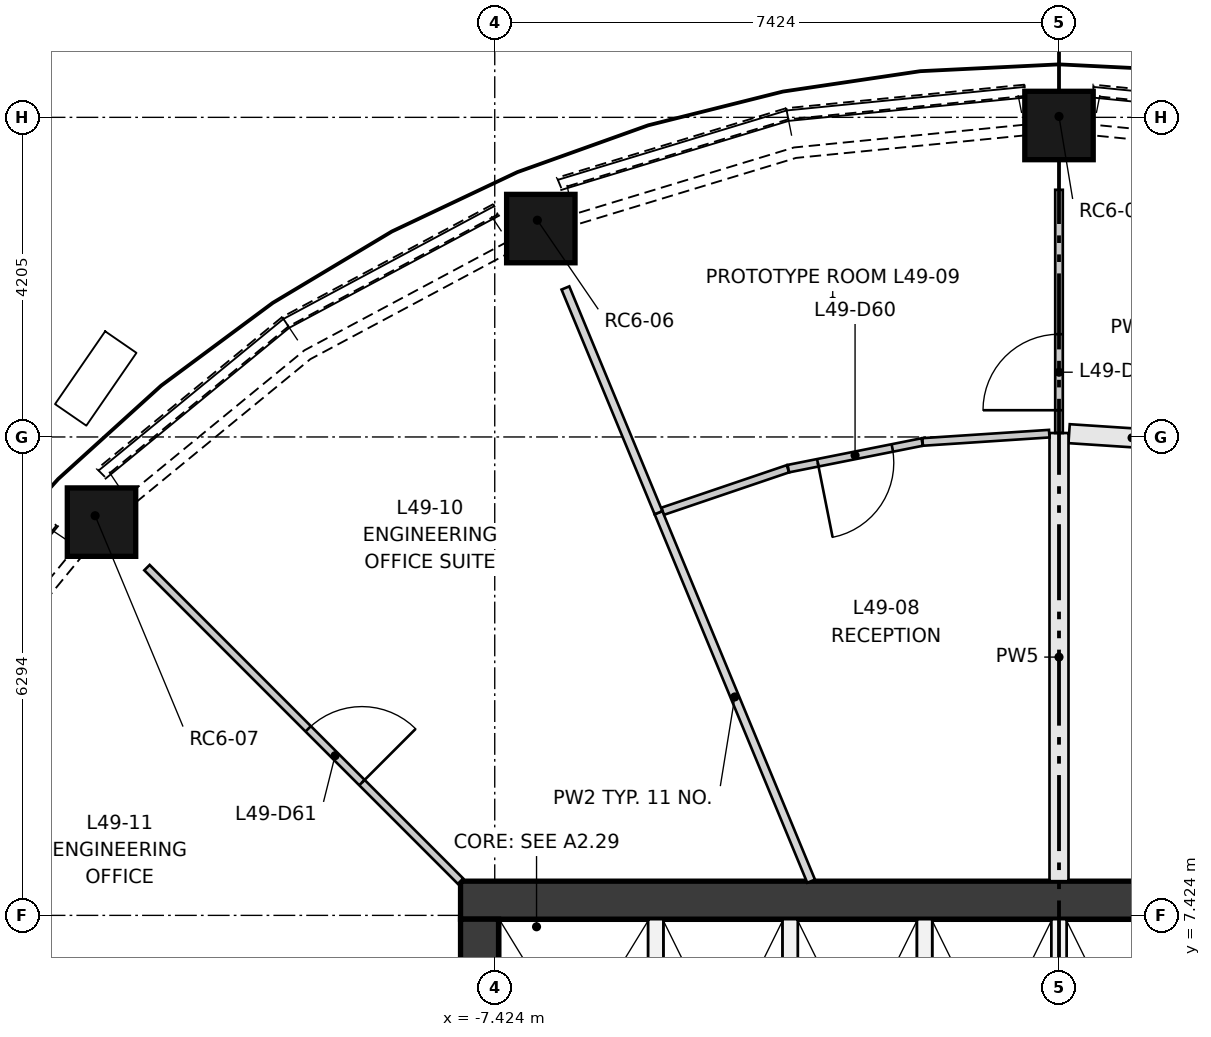
"""IFC4 building model, lengths in metres.
Left out: names, types, materials, properties, quantities, classifications, styles, units other than length and angle.
Written with IfcOpenShell. Run it as: python <this file> out.ifc"""

import sys

from ifc_helpers import new_model, si_unit, direction, frame, frame_2d, origin, origin_2d, place, context, subcontext, project, spatial, polyline, rectangle, outline, extrude, element, fill, save


model = new_model("IFC4")
c1 = context("Model", 3, precision=1e-05, world=origin(), true_north=direction((0.0, 1.0)))
c2 = subcontext(c1, "Body", "Model", "MODEL_VIEW")
j1 = project(units=[si_unit("LENGTHUNIT", "METRE"), si_unit("PLANEANGLEUNIT", "RADIAN")], contexts=[c1])
p1 = place(None, origin())
s1 = spatial("IfcSite", under=j1, at=p1, CompositionType="ELEMENT")
p2 = place(p1, origin())
s2 = spatial("IfcBuilding", under=s1, at=p2, CompositionType="ELEMENT")
p3 = place(p2, frame((0.0, 0.0, 184.3)))
s3 = spatial("IfcBuildingStorey", under=s2, at=p3, CompositionType="ELEMENT", Elevation=184.3)
p4 = place(p3, frame((0.0, 17.935, 0.5), z_axis=(0.0, 0.0, 1.0), x_axis=(1.0, 0.0, 0.0)))
e1 = element("IfcColumn", 1, at=p4, inside=s3, PredefinedType="COLUMN", context=c2, shape_type="SweptSolid", body=[
    extrude(rectangle(XDim=0.9, YDim=0.9, at=origin_2d()), origin(), (0.0, -0.168, 0.986), 2.384),
])
p5 = place(p3, frame((-6.863, 16.57, 0.5), z_axis=(0.0, 0.0, 1.0), x_axis=(0.924120904221, 0.382100188932, 0.0)))
e2 = element("IfcColumn", 2, at=p5, inside=s3, PredefinedType="COLUMN", context=c2, shape_type="SweptSolid", body=[
    extrude(rectangle(XDim=0.9, YDim=0.9, at=origin_2d()), origin(), (0.0, -0.168, 0.986), 2.384),
])
p6 = place(p3, frame((-12.682, 12.682, 0.5), z_axis=(0.0, 0.0, 1.0), x_axis=(0.707106781187, 0.707106781187, 0.0)))
e3 = element("IfcColumn", 3, at=p6, inside=s3, PredefinedType="COLUMN", context=c2, shape_type="SweptSolid", body=[
    extrude(rectangle(XDim=0.9, YDim=0.9, at=origin_2d()), origin(), (0.0, -0.168, 0.986), 2.384),
])
p7 = place(p3, frame((-7.874, 7.624, 0.0), z_axis=(0.0, 0.0, 1.0), x_axis=(1.0, 0.0, 0.0)))
e4 = element("IfcWall", 4, at=p7, inside=s3, PredefinedType="SHEAR", context=c2, shape_type="SweptSolid", body=[
    extrude(rectangle(XDim=15.748, YDim=0.5, at=frame_2d((7.874, 0.0))), origin(), (0.0, 0.0, 1.0), 3.35),
])
p8 = place(p3, frame((-7.624, -7.374, 0.0), z_axis=(0.0, 0.0, 1.0), x_axis=(0.0, 1.0, 0.0)))
e5 = element("IfcWall", 5, at=p8, inside=s3, PredefinedType="SHEAR", context=c2, shape_type="SweptSolid", body=[
    extrude(rectangle(XDim=14.748, YDim=0.5, at=frame_2d((7.374, 0.0))), origin(), (0.0, 0.0, 1.0), 3.35),
])
p9 = place(p8, frame((6.874, 0.0, 0.0)))
e6 = element("IfcOpeningElement", 6, at=p9, cuts=e5, PredefinedType="OPENING", context=c2, shape_type="SweptSolid", body=[
    extrude(rectangle(XDim=1.0, YDim=2.1, at=frame_2d((0.5, 1.05))), frame((0.0, 0.26, 0.0), z_axis=(0.0, -1.0, 0.0), x_axis=(1.0, 0.0, 0.0)), (0.0, 0.0, 1.0), 0.52),
])
p10 = place(p8, frame((3.75, 0.0, 0.0)))
e7 = element("IfcOpeningElement", 7, at=p10, cuts=e5, PredefinedType="OPENING", context=c2, shape_type="SweptSolid", body=[
    extrude(rectangle(XDim=1.8, YDim=2.1, at=frame_2d((0.9, 1.05))), frame((0.0, 0.26, 0.0), z_axis=(0.0, -1.0, 0.0), x_axis=(1.0, 0.0, 0.0)), (0.0, 0.0, 1.0), 0.52),
])
p11 = place(p8, frame((9.198, 0.0, 0.0)))
e8 = element("IfcOpeningElement", 8, at=p11, cuts=e5, PredefinedType="OPENING", context=c2, shape_type="SweptSolid", body=[
    extrude(rectangle(XDim=1.8, YDim=2.1, at=frame_2d((0.9, 1.05))), frame((0.0, 0.26, 0.0), z_axis=(0.0, -1.0, 0.0), x_axis=(1.0, 0.0, 0.0)), (0.0, 0.0, 1.0), 0.52),
])
for number, where, z_axis, x_axis in (
    (9, (-5.305, 4.174, 0.0), (0.0, 0.0, 1.0), (0.0, 1.0, 0.0)),
    (10, (-3.537, 4.174, 0.0), (0.0, 0.0, 1.0), (0.0, 1.0, 0.0)),
    (11, (-1.769, 4.174, 0.0), (0.0, 0.0, 1.0), (0.0, 1.0, 0.0)),
    (12, (0.0, 4.174, 0.0), (0.0, 0.0, 1.0), (0.0, 1.0, 0.0)),
):
    element("IfcWall", number, at=place(p3, frame(where, z_axis=z_axis, x_axis=x_axis)), inside=s3, PredefinedType="PARTITIONING", context=c2, shape_type="SweptSolid", body=[
        extrude(rectangle(XDim=3.2, YDim=0.2, at=frame_2d((1.6, 0.0))), origin(), (0.0, 0.0, 1.0), 3.0),
    ])
p12 = place(p3, frame((3.59, 18.043, 0.0), z_axis=(0.097001095349, 0.981910573414, 0.162611233681), x_axis=(-0.995155966643, 0.098308707783, 5.283619e-06)))
e13 = element("IfcWall", 13, at=p12, inside=s3, PredefinedType="SOLIDWALL", context=c2, shape_type="SweptSolid", body=[
    extrude(outline(polyline([(0.0, 0.0), (3.152, 0.0), (3.138, 0.912), (0.015, 0.912), (0.0, 0.0)])), origin(), (0.0, 0.0, -1.0), 0.3),
])
p13 = place(p3, frame((-0.452, 18.353, 0.0), z_axis=(-0.096960979381, 0.981893053275, 0.162740899619), x_axis=(-0.995159671342, -0.098271198901, 9.28862e-07)))
e14 = element("IfcWall", 14, at=p13, inside=s3, PredefinedType="SOLIDWALL", context=c2, shape_type="SweptSolid", body=[
    extrude(outline(polyline([(0.0, 0.0), (3.152, 1.388e-17), (3.138, 0.912), (0.015, 0.912), (0.0, 0.0)])), origin(), (0.0, 0.0, -1.0), 0.3),
])
p14 = place(p3, frame((-3.59, 18.043, 0.0), z_axis=(-0.286418531815, 0.944194299341, 0.162670064008), x_axis=(-0.956940039415, -0.290285654048, 4.29464e-06)))
e15 = element("IfcWall", 15, at=p14, inside=s3, PredefinedType="SOLIDWALL", context=c2, shape_type="SweptSolid", body=[
    extrude(outline(polyline([(0.0, 0.0), (3.151, 5.551e-17), (3.137, 0.912), (0.014, 0.912), (0.0, 0.0)])), origin(), (0.0, 0.0, -1.0), 0.3),
])
p15 = place(p3, frame((-7.441, 16.782, 0.0), z_axis=(-0.465338838382, 0.870053087177, 0.162688017342), x_axis=(-0.881801348468, -0.471621015005, -6.731272e-06)))
e16 = element("IfcWall", 16, at=p15, inside=s3, PredefinedType="SOLIDWALL", context=c2, shape_type="SweptSolid", body=[
    extrude(outline(polyline([(0.0, 0.0), (3.152, 2.776e-17), (3.137, 0.912), (0.015, 0.912), (0.0, 0.0)])), origin(), (0.0, 0.0, -1.0), 0.3),
])
p16 = place(p3, frame((-10.221, 15.296, 0.0), z_axis=(-0.625791219471, 0.762829436571, 0.162716318582), x_axis=(-0.773132385109, -0.634244680745, 6.479811e-06)))
e17 = element("IfcWall", 17, at=p16, inside=s3, PredefinedType="SOLIDWALL", context=c2, shape_type="SweptSolid", body=[
    extrude(outline(polyline([(0.0, 0.0), (3.151, 0.0), (3.137, 0.912), (0.014, 0.912), (0.0, 0.0)])), origin(), (0.0, 0.0, -1.0), 0.3),
])
p17 = place(p3, frame((-13.297, 12.657, 0.0), z_axis=(-0.762803450932, 0.625801401555, 0.162798959018), x_axis=(-0.634263258583, -0.773117144297, -2.518315e-06)))
e18 = element("IfcWall", 18, at=p17, inside=s3, PredefinedType="SOLIDWALL", context=c2, shape_type="SweptSolid", body=[
    extrude(outline(polyline([(0.0, 0.0), (3.151, 5.551e-17), (3.137, 0.912), (0.015, 0.912), (0.0, 0.0)])), origin(), (0.0, 0.0, -1.0), 0.3),
])
p18 = place(p3, frame((0.133, 13.761, 0.0), z_axis=(0.0, 0.0, 1.0), x_axis=(0.997854270927, -0.065474071153, 0.0)))
e19 = element("IfcWall", 19, at=p18, inside=s3, PredefinedType="PARTITIONING", context=c2, shape_type="SweptSolid", body=[
    extrude(rectangle(XDim=1.659, YDim=0.25, at=frame_2d((0.83, 0.0))), origin(), (0.0, 0.0, 1.0), 3.0),
])
p19 = place(p3, frame((0.0, 7.874, 0.0), z_axis=(0.0, 0.0, 1.0), x_axis=(0.0, 1.0, 0.0)))
e20 = element("IfcWall", 20, at=p19, inside=s3, PredefinedType="PARTITIONING", context=c2, shape_type="SweptSolid", body=[
    extrude(rectangle(XDim=5.896, YDim=0.25, at=frame_2d((2.948, 0.0))), origin(), (0.0, 0.0, 1.0), 3.0),
])
p20 = place(p3, frame((0.0, 13.77, 0.0), z_axis=(0.0, 0.0, 1.0), x_axis=(0.0, 1.0, 0.0)))
e21 = element("IfcWall", 21, at=p20, inside=s3, PredefinedType="PARTITIONING", context=c2, shape_type="SweptSolid", body=[
    extrude(rectangle(XDim=3.2, YDim=0.1, at=frame_2d((1.6, 0.0))), origin(), (0.0, 0.0, 1.0), 3.0),
])
p21 = place(p20, frame((0.3, 0.0, 0.0)))
e22 = element("IfcOpeningElement", 22, at=p21, cuts=e21, PredefinedType="OPENING", context=c2, shape_type="SweptSolid", body=[
    extrude(rectangle(XDim=1.0, YDim=2.1, at=frame_2d((0.5, 1.05))), frame((0.0, 0.06, 0.0), z_axis=(0.0, -1.0, 0.0), x_axis=(1.0, 0.0, 0.0)), (0.0, 0.0, 1.0), 0.12),
])
p22 = place(p3, frame((-5.214, 12.74, 0.0), z_axis=(0.0, 0.0, 1.0), x_axis=(0.946914638305, 0.321485097267, 0.0)))
e23 = element("IfcWall", 23, at=p22, inside=s3, PredefinedType="PARTITIONING", context=c2, shape_type="SweptSolid", body=[
    extrude(rectangle(XDim=1.74, YDim=0.1, at=frame_2d((0.87, 0.0))), origin(), (0.0, 0.0, 1.0), 3.0),
])
p23 = place(p3, frame((-1.801, 13.652, 0.0), z_axis=(0.0, 0.0, 1.0), x_axis=(-0.980789397091, -0.195069624886, 0.0)))
e24 = element("IfcWall", 24, at=p23, inside=s3, PredefinedType="PARTITIONING", context=c2, shape_type="SweptSolid", body=[
    extrude(rectangle(XDim=1.795, YDim=0.1, at=frame_2d((0.897, 0.0))), origin(), (0.0, 0.0, 1.0), 3.0),
])
p24 = place(p23, frame((0.4, 0.0, 0.0)))
e25 = element("IfcOpeningElement", 25, at=p24, cuts=e24, PredefinedType="OPENING", context=c2, shape_type="SweptSolid", body=[
    extrude(rectangle(XDim=1.0, YDim=2.1, at=frame_2d((0.5, 1.05))), frame((0.0, 0.06, 0.0), z_axis=(0.0, -1.0, 0.0), x_axis=(1.0, 0.0, 0.0)), (0.0, 0.0, 1.0), 0.12),
])
p25 = place(p3, frame((-1.794, 13.652, 0.0), z_axis=(0.0, 0.0, 1.0), x_axis=(0.997850681937, 0.065528746043, 0.0)))
e26 = element("IfcWall", 26, at=p25, inside=s3, PredefinedType="PARTITIONING", context=c2, shape_type="SweptSolid", body=[
    extrude(rectangle(XDim=1.669, YDim=0.1, at=frame_2d((0.834, 0.0))), origin(), (0.0, 0.0, 1.0), 3.0),
])
p26 = place(p3, frame((-3.261, 7.874, 0.0), z_axis=(0.0, 0.0, 1.0), x_axis=(-0.382698345407, 0.923873355186, 0.0)))
e27 = element("IfcWall", 27, at=p26, inside=s3, PredefinedType="PARTITIONING", context=c2, shape_type="SweptSolid", body=[
    extrude(rectangle(XDim=5.247, YDim=0.11, at=frame_2d((2.624, 0.0))), origin(), (0.0, 0.0, 1.0), 3.0),
])
p27 = place(p3, frame((-5.27, 12.722, 0.0), z_axis=(0.0, 0.0, 1.0), x_axis=(-0.382675211785, 0.923882937544, 0.0)))
e28 = element("IfcWall", 28, at=p27, inside=s3, PredefinedType="PARTITIONING", context=c2, shape_type="SweptSolid", body=[
    extrude(rectangle(XDim=3.2, YDim=0.11, at=frame_2d((1.6, 0.0))), origin(), (0.0, 0.0, 1.0), 3.0),
])
p28 = place(p3, frame((-12.0, 12.0, 0.0), z_axis=(0.0, 0.0, 1.0), x_axis=(0.707106781187, -0.707106781187, 0.0)))
e29 = element("IfcWall", 29, at=p28, inside=s3, PredefinedType="PARTITIONING", context=c2, shape_type="SweptSolid", body=[
    extrude(rectangle(XDim=5.834, YDim=0.1, at=frame_2d((2.917, 0.0))), origin(), (0.0, 0.0, 1.0), 3.0),
])
p29 = place(p28, frame((3.0, 0.0, 0.0)))
e30 = element("IfcOpeningElement", 30, at=p29, cuts=e29, PredefinedType="OPENING", context=c2, shape_type="SweptSolid", body=[
    extrude(rectangle(XDim=1.0, YDim=2.1, at=frame_2d((0.5, 1.05))), frame((0.0, 0.06, 0.0), z_axis=(0.0, -1.0, 0.0), x_axis=(1.0, 0.0, 0.0)), (0.0, 0.0, 1.0), 0.12),
])
p30 = place(p21, origin())
e31 = element("IfcDoor", 31, at=p30, inside=s3, OperationType="SINGLE_SWING_LEFT", PredefinedType="DOOR", context=c2, shape_type="SweptSolid", body=[
    extrude(rectangle(XDim=1.0, YDim=2.1, at=frame_2d((0.5, 1.05))), frame((0.0, 0.025, 0.0), z_axis=(0.0, -1.0, 0.0), x_axis=(1.0, 0.0, 0.0)), (0.0, 0.0, 1.0), 0.05),
])
fill(e22, e31)
p31 = place(p24, origin())
e32 = element("IfcDoor", 32, at=p31, inside=s3, OperationType="SINGLE_SWING_RIGHT", PredefinedType="DOOR", context=c2, shape_type="SweptSolid", body=[
    extrude(rectangle(XDim=1.0, YDim=2.1, at=frame_2d((0.5, 1.05))), frame((0.0, 0.025, 0.0), z_axis=(0.0, -1.0, 0.0), x_axis=(1.0, 0.0, 0.0)), (0.0, 0.0, 1.0), 0.05),
])
fill(e25, e32)
p32 = place(p29, origin())
e33 = element("IfcDoor", 33, at=p32, inside=s3, OperationType="SINGLE_SWING_RIGHT", PredefinedType="DOOR", context=c2, shape_type="SweptSolid", body=[
    extrude(rectangle(XDim=1.0, YDim=2.1, at=frame_2d((0.5, 1.05))), frame((0.0, 0.025, 0.0), z_axis=(0.0, -1.0, 0.0), x_axis=(1.0, 0.0, 0.0)), (0.0, 0.0, 1.0), 0.05),
])
fill(e30, e33)
save(model, sys.argv[1])
